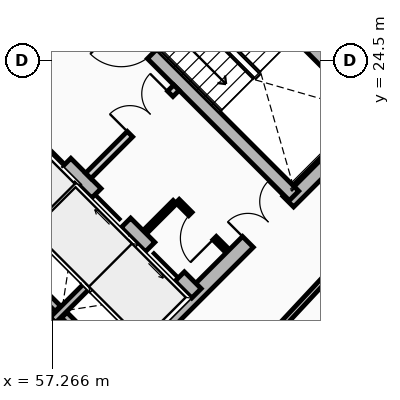
"""IFC4 building model, lengths in metres.
Left out: names, types, materials, properties, quantities, classifications, styles, units other than length and angle.
Written with IfcOpenShell. Run it as: python <this file> out.ifc"""

import sys

from ifc_helpers import new_model, si_unit, direction, frame, frame_2d, origin, place, context, subcontext, project, spatial, rectangle, extrude, source, transform, mapped, element, fill, save


model = new_model("IFC4")
c1 = context("Model", 3, precision=1e-05, world=origin(), true_north=direction((0.0, 1.0)))
c2 = subcontext(c1, "Body", "Model", "MODEL_VIEW")
j1 = project(units=[si_unit("LENGTHUNIT", "METRE"), si_unit("PLANEANGLEUNIT", "RADIAN")], contexts=[c1])
p1 = place(None, origin())
s1 = spatial("IfcSite", under=j1, at=p1, CompositionType="ELEMENT")
p2 = place(p1, origin())
s2 = spatial("IfcBuilding", under=s1, at=p2, CompositionType="ELEMENT")
p3 = place(p2, frame((0.0, 0.0, 217.03)))
s3 = spatial("IfcBuildingStorey", under=s2, at=p3, CompositionType="ELEMENT", Elevation=217.03)
for number, where, z_axis, x_axis in (
    (1, (58.702, 15.732, 0.0), (0.0, 0.0, 1.0), (-0.707, 0.707, 0.0)),
    (2, (66.268, 23.298, 0.0), (0.0, 0.0, 1.0), (-0.707, 0.707, 0.0)),
):
    element("IfcWall", number, at=place(p3, frame(where, z_axis=z_axis, x_axis=x_axis)), inside=s3, PredefinedType="SHEAR", context=c2, shape_type="SweptSolid", body=[
        extrude(rectangle(XDim=14.1, YDim=0.4, at=frame_2d((7.05, 0.0))), origin(), (0.0, 0.0, 1.0), 2.91),
    ])
p4 = place(p3, frame((58.561, 15.873, 0.0), z_axis=(0.0, 0.0, 1.0), x_axis=(0.707106781187, 0.707106781187, 0.0)))
e3 = element("IfcWall", 3, at=p4, inside=s3, PredefinedType="SHEAR", context=c2, shape_type="SweptSolid", body=[
    extrude(rectangle(XDim=10.7, YDim=0.4, at=frame_2d((5.35, 0.0))), origin(), (0.0, 0.0, 1.0), 2.91),
])
m1 = source(origin(), c2, "Body", "SweptSolid", [
    extrude(rectangle(XDim=1.5, YDim=2.02, at=frame_2d((0.75, 1.01))), frame((0.0, 0.21, 0.0), z_axis=(0.0, -1.0, 0.0), x_axis=(1.0, 0.0, 0.0)), (0.0, 0.0, 1.0), 0.42),
])
p5 = place(p4, frame((5.45, 0.0, 0.0)))
e4 = element("IfcOpeningElement", 4, at=p5, cuts=e3, PredefinedType="OPENING", context=c2, shape_type="MappedRepresentation", body=[
    mapped(m1, transform((0.0, 0.0, 0.0), x_axis=(1.0, 0.0, 0.0), y_axis=(0.0, 1.0, 0.0), z_axis=(0.0, 0.0, 1.0), scale=1.0)),
])
p6 = place(p3, frame((61.06, 18.373, 0.0), z_axis=(0.0, 0.0, 1.0), x_axis=(-0.707106781187, 0.707106781187, 0.0)))
e5 = element("IfcWall", 5, at=p6, inside=s3, PredefinedType="SHEAR", context=c2, shape_type="SweptSolid", body=[
    extrude(rectangle(XDim=13.7, YDim=0.35, at=frame_2d((6.85, 0.0))), origin(), (0.0, 0.0, 1.0), 2.91),
])
m2 = source(origin(), c2, "Body", "SweptSolid", [
    extrude(rectangle(XDim=1.1, YDim=2.015, at=frame_2d((0.55, 1.007))), frame((0.0, 0.185, 0.0), z_axis=(0.0, -1.0, 0.0), x_axis=(1.0, 0.0, 0.0)), (0.0, 0.0, 1.0), 0.37),
])
p7 = place(p6, frame((4.85, 0.0, 0.0)))
e6 = element("IfcOpeningElement", 6, at=p7, cuts=e5, PredefinedType="OPENING", context=c2, shape_type="MappedRepresentation", body=[
    mapped(m2, transform((0.0, 0.0, 0.0), x_axis=(1.0, 0.0, 0.0), y_axis=(0.0, 1.0, 0.0), z_axis=(0.0, 0.0, 1.0), scale=1.0)),
])
p8 = place(p6, frame((0.625, 0.0, 0.0)))
e7 = element("IfcOpeningElement", 7, at=p8, cuts=e5, PredefinedType="OPENING", context=c2, shape_type="MappedRepresentation", body=[
    mapped(m2, transform((0.0, 0.0, 0.0), x_axis=(1.0, 0.0, 0.0), y_axis=(0.0, 1.0, 0.0), z_axis=(0.0, 0.0, 1.0), scale=1.0)),
])
p9 = place(p6, frame((2.625, 0.0, 0.0)))
e8 = element("IfcOpeningElement", 8, at=p9, cuts=e5, PredefinedType="OPENING", context=c2, shape_type="MappedRepresentation", body=[
    mapped(m2, transform((0.0, 0.0, 0.0), x_axis=(1.0, 0.0, 0.0), y_axis=(0.0, 1.0, 0.0), z_axis=(0.0, 0.0, 1.0), scale=1.0)),
])
m3 = source(origin(), c2, "Body", "SweptSolid", [
    extrude(rectangle(XDim=1.15, YDim=2.02, at=frame_2d((0.575, 1.01))), frame((0.0, 0.185, 0.0), z_axis=(0.0, -1.0, 0.0), x_axis=(1.0, 0.0, 0.0)), (0.0, 0.0, 1.0), 0.37),
])
p10 = place(p6, frame((7.27, 0.0, 0.0)))
e9 = element("IfcOpeningElement", 9, at=p10, cuts=e5, PredefinedType="OPENING", context=c2, shape_type="MappedRepresentation", body=[
    mapped(m3, transform((0.0, 0.0, 0.0), x_axis=(1.0, 0.0, 0.0), y_axis=(0.0, 1.0, 0.0), z_axis=(0.0, 0.0, 1.0), scale=1.0)),
])
p11 = place(p3, frame((63.627, 20.94, 0.0), z_axis=(0.0, 0.0, 1.0), x_axis=(-0.707119496762, 0.707094065383, 0.0)))
e10 = element("IfcWall", 10, at=p11, inside=s3, PredefinedType="SHEAR", context=c2, shape_type="SweptSolid", body=[
    extrude(rectangle(XDim=9.6, YDim=0.35, at=frame_2d((4.8, 0.0))), origin(), (0.0, 0.0, 1.0), 2.91),
])
p12 = place(p11, frame((5.28, 0.0, 0.0)))
e11 = element("IfcOpeningElement", 11, at=p12, cuts=e10, PredefinedType="OPENING", context=c2, shape_type="MappedRepresentation", body=[
    mapped(m3, transform((0.0, 0.0, 0.0), x_axis=(1.0, 0.0, 0.0), y_axis=(0.0, 1.0, 0.0), z_axis=(0.0, 0.0, 1.0), scale=1.0)),
])
p13 = place(p3, frame((65.812, 23.125, 0.0), z_axis=(0.0, 0.0, 1.0), x_axis=(-0.707106781187, 0.707106781187, 0.0)))
e12 = element("IfcWall", 12, at=p13, inside=s3, PredefinedType="SHEAR", context=c2, shape_type="SweptSolid", body=[
    extrude(rectangle(XDim=6.695, YDim=0.35, at=frame_2d((3.348, 0.0))), origin(), (0.0, 0.0, 1.0), 2.91),
])
p14 = place(p3, frame((55.888, 19.069, 0.0), z_axis=(0.0, 0.0, 1.0), x_axis=(0.707106781187, 0.707106781187, 0.0)))
e13 = element("IfcWall", 13, at=p14, inside=s3, PredefinedType="SHEAR", context=c2, shape_type="SweptSolid", body=[
    extrude(rectangle(XDim=2.97, YDim=0.2, at=frame_2d((1.485, 0.0))), origin(), (0.0, 0.0, 1.0), 2.91),
])
p15 = place(p3, frame((57.284, 17.673, 0.0), z_axis=(0.0, 0.0, 1.0), x_axis=(0.707147878904, 0.70706568108, 0.0)))
e14 = element("IfcWall", 14, at=p15, inside=s3, PredefinedType="SHEAR", context=c2, shape_type="SweptSolid", body=[
    extrude(rectangle(XDim=2.97, YDim=0.2, at=frame_2d((1.485, 0.0))), origin(), (0.0, 0.0, 1.0), 2.91),
])
p16 = place(p3, frame((57.412, 17.97, 0.0), z_axis=(0.0, 0.0, 1.0), x_axis=(-0.707106781187, 0.707106781187, 0.0)))
e15 = element("IfcWall", 15, at=p16, inside=s3, PredefinedType="SHEAR", context=c2, shape_type="SweptSolid", body=[
    extrude(rectangle(XDim=1.735, YDim=0.2, at=frame_2d((0.867, 0.0))), origin(), (0.0, 0.0, 1.0), 2.91),
])
p17 = place(p3, frame((58.737, 16.644, 0.0), z_axis=(0.0, 0.0, 1.0), x_axis=(-0.707032117043, 0.707181437447, 0.0)))
e16 = element("IfcWall", 16, at=p17, inside=s3, PredefinedType="SHEAR", context=c2, shape_type="SweptSolid", body=[
    extrude(rectangle(XDim=1.635, YDim=0.2, at=frame_2d((0.817, 0.0))), origin(), (0.0, 0.0, 1.0), 2.91),
])
p18 = place(p3, frame((58.214, 21.467, 0.0), z_axis=(0.0, 0.0, 1.0), x_axis=(0.707106781187, 0.707106781187, 0.0)))
e17 = element("IfcWall", 17, at=p18, inside=s3, PredefinedType="PARTITIONING", context=c2, shape_type="SweptSolid", body=[
    extrude(rectangle(XDim=3.28, YDim=0.2, at=frame_2d((1.64, 0.0))), origin(), (0.0, 0.0, 1.0), 2.685),
])
m4 = source(origin(), c2, "Body", "SweptSolid", [
    extrude(rectangle(XDim=1.5, YDim=2.02, at=frame_2d((0.75, 1.01))), frame((0.0, 0.11, 0.0), z_axis=(0.0, -1.0, 0.0), x_axis=(1.0, 0.0, 0.0)), (0.0, 0.0, 1.0), 0.22),
])
p19 = place(p18, frame((1.55, 0.0, 0.0)))
e18 = element("IfcOpeningElement", 18, at=p19, cuts=e17, PredefinedType="OPENING", context=c2, shape_type="MappedRepresentation", body=[
    mapped(m4, transform((0.0, 0.0, 0.0), x_axis=(1.0, 0.0, 0.0), y_axis=(0.0, 1.0, 0.0), z_axis=(0.0, 0.0, 1.0), scale=1.0)),
])
p20 = place(p3, frame((54.961, 24.719, 0.0), z_axis=(0.0, 0.0, 1.0), x_axis=(0.707106781187, 0.707106781187, 0.0)))
e19 = element("IfcWall", 19, at=p20, inside=s3, PredefinedType="PARTITIONING", context=c2, shape_type="SweptSolid", body=[
    extrude(rectangle(XDim=3.28, YDim=0.2, at=frame_2d((1.64, 0.0))), origin(), (0.0, 0.0, 1.0), 2.685),
])
m5 = source(origin(), c2, "Body", "SweptSolid", [
    extrude(rectangle(XDim=0.9, YDim=2.005, at=frame_2d((0.45, 1.002))), frame((0.0, 0.11, 0.0), z_axis=(0.0, -1.0, 0.0), x_axis=(1.0, 0.0, 0.0)), (0.0, 0.0, 1.0), 0.22),
])
p21 = place(p20, frame((0.16, 0.0, 0.0)))
e20 = element("IfcOpeningElement", 20, at=p21, cuts=e19, PredefinedType="OPENING", context=c2, shape_type="MappedRepresentation", body=[
    mapped(m5, transform((0.0, 0.0, 0.0), x_axis=(1.0, 0.0, 0.0), y_axis=(0.0, 1.0, 0.0), z_axis=(0.0, 0.0, 1.0), scale=1.0)),
])
p22 = place(p3, frame((61.835, 19.529, 0.0), z_axis=(0.0, 0.0, 1.0), x_axis=(-0.707174592913, 0.707038962956, 0.0)))
e21 = element("IfcWall", 21, at=p22, inside=s3, PredefinedType="PARTITIONING", context=c2, shape_type="SweptSolid", body=[
    extrude(rectangle(XDim=1.8, YDim=0.125, at=frame_2d((0.9, 0.0))), origin(), (0.0, 0.0, 1.0), 2.685),
])
m6 = source(origin(), c2, "Body", "SweptSolid", [
    extrude(rectangle(XDim=0.9, YDim=2.005, at=frame_2d((0.45, 1.002))), frame((0.0, 0.073, 0.0), z_axis=(0.0, -1.0, 0.0), x_axis=(1.0, 0.0, 0.0)), (0.0, 0.0, 1.0), 0.145),
])
p23 = place(p22, frame((0.42, 0.0, 0.0)))
e22 = element("IfcOpeningElement", 22, at=p23, cuts=e21, PredefinedType="OPENING", context=c2, shape_type="MappedRepresentation", body=[
    mapped(m6, transform((0.0, 0.0, 0.0), x_axis=(1.0, 0.0, 0.0), y_axis=(0.0, 1.0, 0.0), z_axis=(0.0, 0.0, 1.0), scale=1.0)),
])
p24 = place(p3, frame((59.713, 19.996, 0.0), z_axis=(0.0, 0.0, 1.0), x_axis=(0.707217726, 0.706995818963, 0.0)))
e23 = element("IfcWall", 23, at=p24, inside=s3, PredefinedType="PARTITIONING", context=c2, shape_type="SweptSolid", body=[
    extrude(rectangle(XDim=1.1, YDim=0.125, at=frame_2d((0.55, 0.0))), origin(), (0.0, 0.0, 1.0), 2.685),
])
p25 = place(p3, frame((62.736, 16.924, 0.0), z_axis=(0.0, 0.0, 1.0), x_axis=(0.681946700833, 0.731401871219, 0.0)))
e24 = element("IfcWall", 24, at=p25, inside=s3, PredefinedType="PARTITIONING", context=c2, shape_type="SweptSolid", body=[
    extrude(rectangle(XDim=6.393, YDim=0.15, at=frame_2d((3.196, 0.0))), origin(), (0.0, 0.0, 1.0), 2.255),
])
m7 = source(origin(), c2, "Body", "SweptSolid", [
    extrude(rectangle(XDim=1.1, YDim=2.015, at=frame_2d((0.55, 1.007))), frame((0.0, 0.025, 0.0), z_axis=(0.0, -1.0, 0.0), x_axis=(1.0, 0.0, 0.0)), (0.0, 0.0, 1.0), 0.05),
])
p26 = place(p7, origin())
e25 = element("IfcDoor", 25, at=p26, inside=s3, OperationType="SLIDING_TO_LEFT", PredefinedType="DOOR", context=c2, shape_type="MappedRepresentation", body=[
    mapped(m7, transform((0.0, 0.0, 0.0), x_axis=(1.0, 0.0, 0.0), y_axis=(0.0, 1.0, 0.0), z_axis=(0.0, 0.0, 1.0), scale=1.0)),
])
fill(e6, e25)
p27 = place(p8, origin())
e26 = element("IfcDoor", 26, at=p27, inside=s3, OperationType="SLIDING_TO_LEFT", PredefinedType="DOOR", context=c2, shape_type="MappedRepresentation", body=[
    mapped(m7, transform((0.0, 0.0, 0.0), x_axis=(1.0, 0.0, 0.0), y_axis=(0.0, 1.0, 0.0), z_axis=(0.0, 0.0, 1.0), scale=1.0)),
])
fill(e7, e26)
p28 = place(p9, origin())
e27 = element("IfcDoor", 27, at=p28, inside=s3, OperationType="SLIDING_TO_RIGHT", PredefinedType="DOOR", context=c2, shape_type="MappedRepresentation", body=[
    mapped(m7, transform((0.0, 0.0, 0.0), x_axis=(1.0, 0.0, 0.0), y_axis=(0.0, 1.0, 0.0), z_axis=(0.0, 0.0, 1.0), scale=1.0)),
])
fill(e8, e27)
m8 = source(origin(), c2, "Body", "SweptSolid", [
    extrude(rectangle(XDim=1.15, YDim=2.02, at=frame_2d((0.575, 1.01))), frame((0.0, 0.025, 0.0), z_axis=(0.0, -1.0, 0.0), x_axis=(1.0, 0.0, 0.0)), (0.0, 0.0, 1.0), 0.05),
])
p29 = place(p12, origin())
e28 = element("IfcDoor", 28, at=p29, inside=s3, OperationType="SINGLE_SWING_RIGHT", PredefinedType="DOOR", context=c2, shape_type="MappedRepresentation", body=[
    mapped(m8, transform((0.0, 0.0, 0.0), x_axis=(1.0, 0.0, 0.0), y_axis=(0.0, 1.0, 0.0), z_axis=(0.0, 0.0, 1.0), scale=1.0)),
])
fill(e11, e28)
m9 = source(origin(), c2, "Body", "SweptSolid", [
    extrude(rectangle(XDim=1.5, YDim=2.02, at=frame_2d((0.75, 1.01))), frame((0.0, 0.025, 0.0), z_axis=(0.0, -1.0, 0.0), x_axis=(1.0, 0.0, 0.0)), (0.0, 0.0, 1.0), 0.05),
])
p30 = place(p5, origin())
e29 = element("IfcDoor", 29, at=p30, inside=s3, OperationType="DOUBLE_DOOR_SINGLE_SWING", PredefinedType="DOOR", context=c2, shape_type="MappedRepresentation", body=[
    mapped(m9, transform((0.0, 0.0, 0.0), x_axis=(1.0, 0.0, 0.0), y_axis=(0.0, 1.0, 0.0), z_axis=(0.0, 0.0, 1.0), scale=1.0)),
])
fill(e4, e29)
p31 = place(p19, origin())
e30 = element("IfcDoor", 30, at=p31, inside=s3, OperationType="DOUBLE_DOOR_SINGLE_SWING", PredefinedType="DOOR", context=c2, shape_type="MappedRepresentation", body=[
    mapped(m9, transform((0.0, 0.0, 0.0), x_axis=(1.0, 0.0, 0.0), y_axis=(0.0, 1.0, 0.0), z_axis=(0.0, 0.0, 1.0), scale=1.0)),
])
fill(e18, e30)
m10 = source(origin(), c2, "Body", "SweptSolid", [
    extrude(rectangle(XDim=0.9, YDim=2.005, at=frame_2d((0.45, 1.002))), frame((0.0, 0.025, 0.0), z_axis=(0.0, -1.0, 0.0), x_axis=(1.0, 0.0, 0.0)), (0.0, 0.0, 1.0), 0.05),
])
p32 = place(p23, origin())
e31 = element("IfcDoor", 31, at=p32, inside=s3, OperationType="SINGLE_SWING_LEFT", PredefinedType="DOOR", context=c2, shape_type="MappedRepresentation", body=[
    mapped(m10, transform((0.0, 0.0, 0.0), x_axis=(1.0, 0.0, 0.0), y_axis=(0.0, 1.0, 0.0), z_axis=(0.0, 0.0, 1.0), scale=1.0)),
])
fill(e22, e31)
save(model, sys.argv[1])
